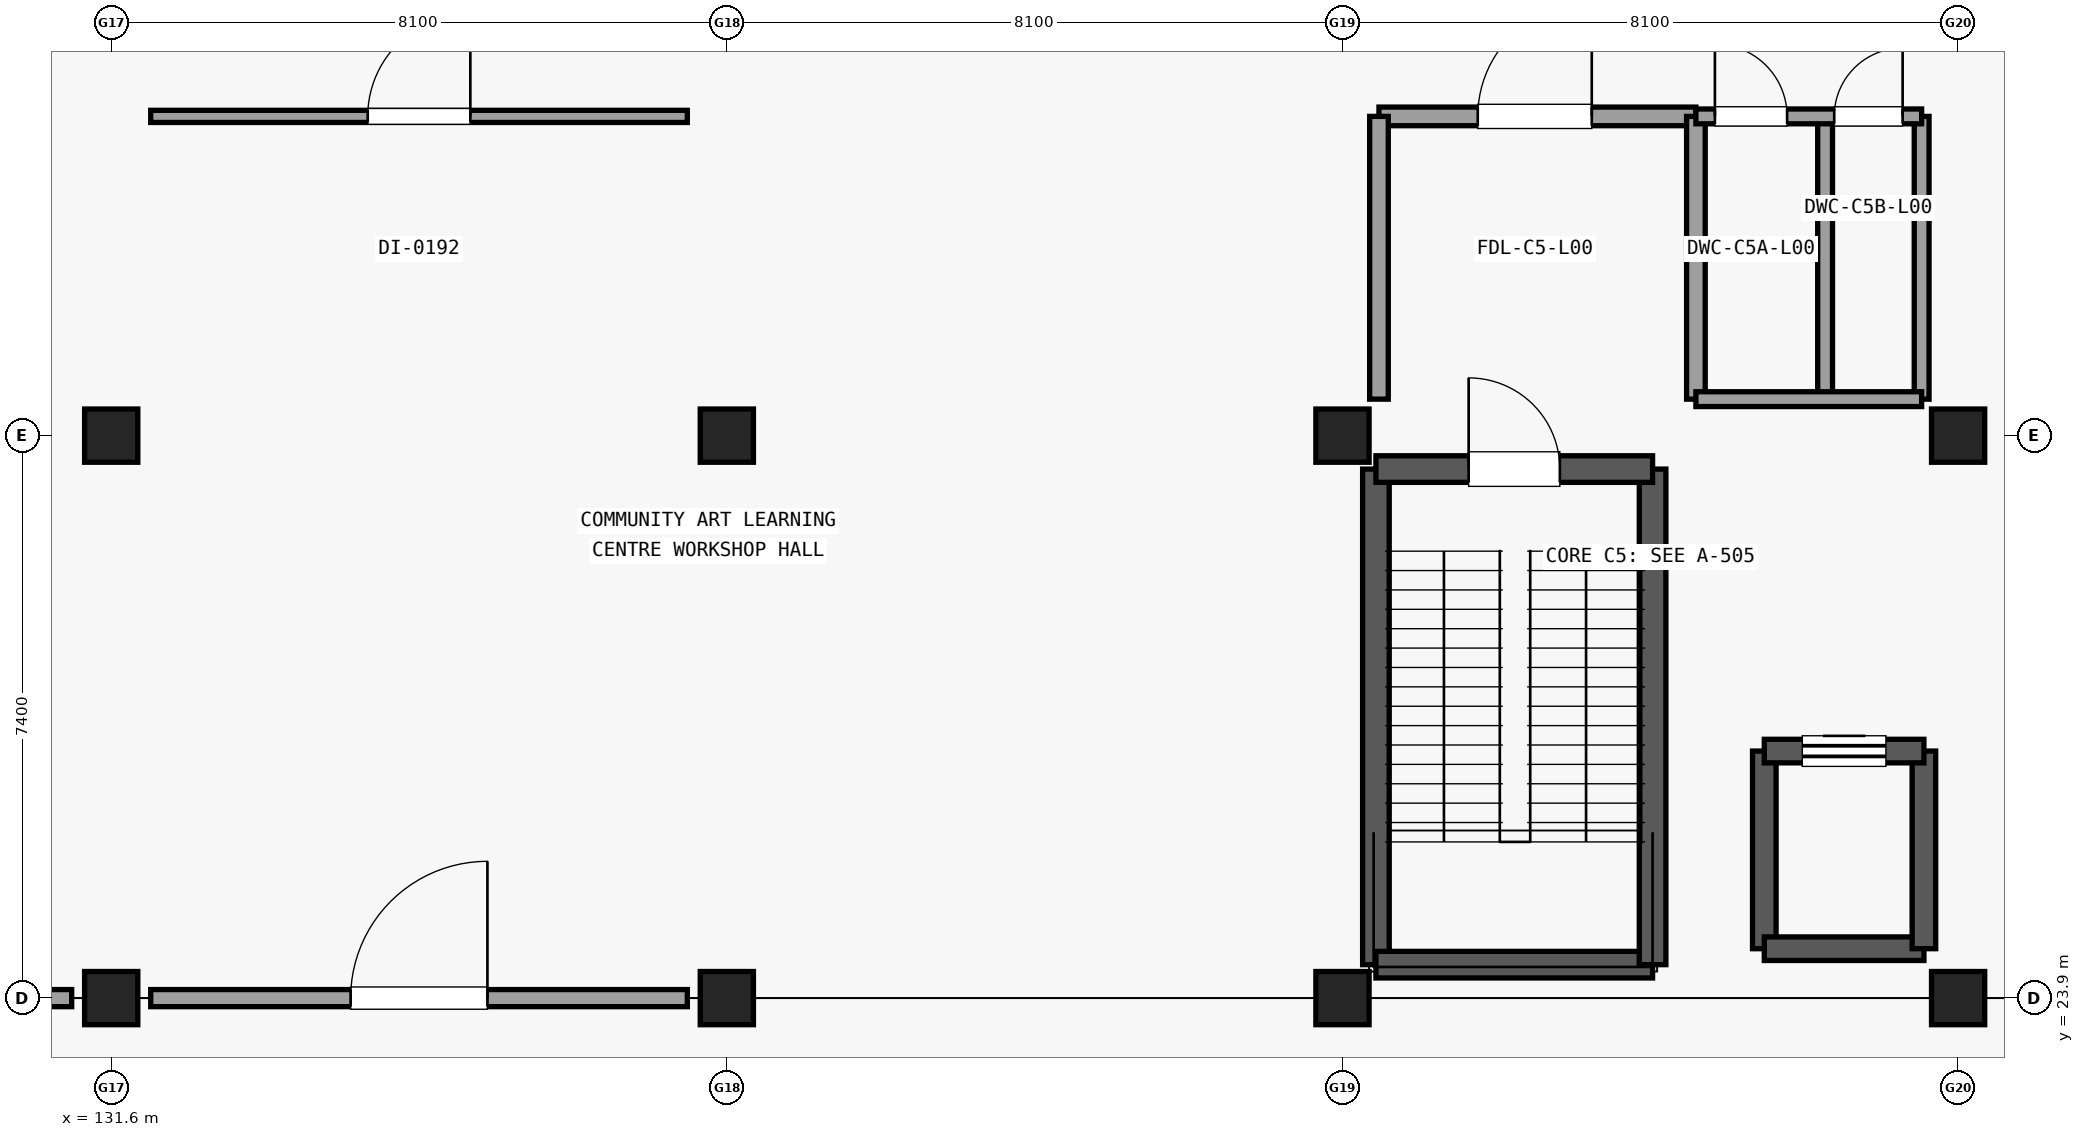
"""IFC4 building model, lengths in metres.
Left out: names, types, materials, properties, quantities, classifications, styles, units other than length and angle.
Written with IfcOpenShell. Run it as: python <this file> out.ifc"""

import sys

from ifc_helpers import new_model, si_unit, direction, frame, frame_2d, origin, origin_2d, place, context, subcontext, project, spatial, rectangle, extrude, element, fill, save


model = new_model("IFC4")
c1 = context("Model", 3, precision=1e-05, world=origin(), true_north=direction((0.0, 1.0)))
c2 = subcontext(c1, "Body", "Model", "MODEL_VIEW")
j1 = project(units=[si_unit("LENGTHUNIT", "METRE"), si_unit("PLANEANGLEUNIT", "RADIAN")], contexts=[c1])
p1 = place(None, origin())
s1 = spatial("IfcSite", under=j1, at=p1, CompositionType="ELEMENT")
p2 = place(p1, origin())
s2 = spatial("IfcBuilding", under=s1, at=p2, CompositionType="ELEMENT")
p3 = place(p2, origin())
s3 = spatial("IfcBuildingStorey", under=s2, at=p3, CompositionType="ELEMENT", Elevation=0.0)
for number, where, z_axis, x_axis in (
    (1, (131.6, 23.9, 0.0), (0.0, 0.0, 1.0), (1.0, 0.0, 0.0)),
    (2, (131.6, 31.3, 0.0), (0.0, 0.0, 1.0), (1.0, 0.0, 0.0)),
):
    element("IfcColumn", number, at=place(p3, frame(where, z_axis=z_axis, x_axis=x_axis)), inside=s3, PredefinedType="COLUMN", context=c2, shape_type="SweptSolid", body=[
        extrude(rectangle(XDim=0.7, YDim=0.7, at=origin_2d()), origin(), (0.0, 0.0, 1.0), 5.135),
    ])
for number, where, z_axis, x_axis in (
    (3, (139.7, 23.9, -0.28), (0.0, 0.0, 1.0), (1.0, 0.0, 0.0)),
    (4, (139.7, 31.3, -0.28), (0.0, 0.0, 1.0), (1.0, 0.0, 0.0)),
    (5, (147.8, 23.9, -0.28), (0.0, 0.0, 1.0), (1.0, 0.0, 0.0)),
    (6, (147.8, 31.3, -0.28), (0.0, 0.0, 1.0), (1.0, 0.0, 0.0)),
    (7, (155.9, 23.9, -0.28), (0.0, 0.0, 1.0), (1.0, 0.0, 0.0)),
    (8, (155.9, 31.3, -0.28), (0.0, 0.0, 1.0), (1.0, 0.0, 0.0)),
):
    element("IfcColumn", number, at=place(p3, frame(where, z_axis=z_axis, x_axis=x_axis)), inside=s3, PredefinedType="COLUMN", context=c2, shape_type="SweptSolid", body=[
        extrude(rectangle(XDim=0.7, YDim=0.7, at=origin_2d()), origin(), (0.0, 0.0, 1.0), 5.415),
    ])
p4 = place(p3, frame((148.24, 24.34, 0.0), z_axis=(0.0, 0.0, 1.0), x_axis=(0.0, 1.0, 0.0)))
e9 = element("IfcWall", 9, at=p4, inside=s3, PredefinedType="SHEAR", context=c2, shape_type="SweptSolid", body=[
    extrude(rectangle(XDim=6.52, YDim=0.35, at=frame_2d((3.26, 0.0))), origin(), (0.0, 0.0, 1.0), 5.13),
])
p5 = place(p3, frame((148.24, 24.34, 0.0), z_axis=(0.0, 0.0, 1.0), x_axis=(1.0, 0.0, 0.0)))
e10 = element("IfcWall", 10, at=p5, inside=s3, PredefinedType="SHEAR", context=c2, shape_type="SweptSolid", body=[
    extrude(rectangle(XDim=3.64, YDim=0.35, at=frame_2d((1.82, 0.0))), origin(), (0.0, 0.0, 1.0), 5.13),
])
p6 = place(p3, frame((151.88, 24.34, 0.0), z_axis=(0.0, 0.0, 1.0), x_axis=(0.0, 1.0, 0.0)))
e11 = element("IfcWall", 11, at=p6, inside=s3, PredefinedType="SHEAR", context=c2, shape_type="SweptSolid", body=[
    extrude(rectangle(XDim=6.52, YDim=0.35, at=frame_2d((3.26, 0.0))), origin(), (0.0, 0.0, 1.0), 5.13),
])
p7 = place(p3, frame((148.24, 30.86, 0.0), z_axis=(0.0, 0.0, 1.0), x_axis=(1.0, 0.0, 0.0)))
e12 = element("IfcWall", 12, at=p7, inside=s3, PredefinedType="SHEAR", context=c2, shape_type="SweptSolid", body=[
    extrude(rectangle(XDim=3.64, YDim=0.35, at=frame_2d((1.82, 0.0))), origin(), (0.0, 0.0, 1.0), 5.13),
])
p8 = place(p7, frame((1.22, 0.0, 0.0)))
e13 = element("IfcOpeningElement", 13, at=p8, cuts=e12, PredefinedType="OPENING", context=c2, shape_type="SweptSolid", body=[
    extrude(rectangle(XDim=1.2, YDim=2.15, at=frame_2d((0.6, 1.075))), frame((0.0, 0.185, 0.0), z_axis=(0.0, -1.0, 0.0), x_axis=(1.0, 0.0, 0.0)), (0.0, 0.0, 1.0), 0.37),
])
p9 = place(p3, frame((153.35, 24.55, 0.0), z_axis=(0.0, 0.0, 1.0), x_axis=(0.0, 1.0, 0.0)))
e14 = element("IfcWall", 14, at=p9, inside=s3, PredefinedType="SHEAR", context=c2, shape_type="SweptSolid", body=[
    extrude(rectangle(XDim=2.6, YDim=0.31, at=frame_2d((1.3, 0.0))), origin(), (0.0, 0.0, 1.0), 5.13),
])
p10 = place(p3, frame((153.35, 24.55, 0.0), z_axis=(0.0, 0.0, 1.0), x_axis=(1.0, 0.0, 0.0)))
e15 = element("IfcWall", 15, at=p10, inside=s3, PredefinedType="SHEAR", context=c2, shape_type="SweptSolid", body=[
    extrude(rectangle(XDim=2.1, YDim=0.31, at=frame_2d((1.05, 0.0))), origin(), (0.0, 0.0, 1.0), 5.13),
])
p11 = place(p3, frame((155.45, 24.55, 0.0), z_axis=(0.0, 0.0, 1.0), x_axis=(0.0, 1.0, 0.0)))
e16 = element("IfcWall", 16, at=p11, inside=s3, PredefinedType="SHEAR", context=c2, shape_type="SweptSolid", body=[
    extrude(rectangle(XDim=2.6, YDim=0.31, at=frame_2d((1.3, 0.0))), origin(), (0.0, 0.0, 1.0), 5.13),
])
p12 = place(p3, frame((153.35, 27.15, 0.0), z_axis=(0.0, 0.0, 1.0), x_axis=(1.0, 0.0, 0.0)))
e17 = element("IfcWall", 17, at=p12, inside=s3, PredefinedType="SHEAR", context=c2, shape_type="SweptSolid", body=[
    extrude(rectangle(XDim=2.1, YDim=0.31, at=frame_2d((1.05, 0.0))), origin(), (0.0, 0.0, 1.0), 5.13),
])
p13 = place(p12, frame((0.5, 0.0, 0.0)))
e18 = element("IfcOpeningElement", 18, at=p13, cuts=e17, PredefinedType="OPENING", context=c2, shape_type="SweptSolid", body=[
    extrude(rectangle(XDim=1.1, YDim=2.15, at=frame_2d((0.55, 1.075))), frame((0.0, 0.165, 0.0), z_axis=(0.0, -1.0, 0.0), x_axis=(1.0, 0.0, 0.0)), (0.0, 0.0, 1.0), 0.33),
])
p14 = place(p3, frame((148.28, 35.5, 0.0), z_axis=(0.0, 0.0, 1.0), x_axis=(1.0, 0.0, 0.0)))
e19 = element("IfcWall", 19, at=p14, inside=s3, PredefinedType="PARTITIONING", context=c2, shape_type="SweptSolid", body=[
    extrude(rectangle(XDim=4.17, YDim=0.245, at=frame_2d((2.085, 0.0))), origin(), (0.0, 0.0, 1.0), 4.325),
])
p15 = place(p14, frame((1.3, 0.0, 0.0)))
e20 = element("IfcOpeningElement", 20, at=p15, cuts=e19, PredefinedType="OPENING", context=c2, shape_type="SweptSolid", body=[
    extrude(rectangle(XDim=1.5, YDim=2.15, at=frame_2d((0.75, 1.075))), frame((0.0, 0.133, 0.0), z_axis=(0.0, -1.0, 0.0), x_axis=(1.0, 0.0, 0.0)), (0.0, 0.0, 1.0), 0.265),
])
for number, where, z_axis, x_axis in (
    (21, (148.28, 31.78, 0.0), (0.0, 0.0, 1.0), (0.0, 1.0, 0.0)),
    (22, (152.45, 31.78, 0.0), (0.0, 0.0, 1.0), (0.0, 1.0, 0.0)),
):
    element("IfcWall", number, at=place(p3, frame(where, z_axis=z_axis, x_axis=x_axis)), inside=s3, PredefinedType="PARTITIONING", context=c2, shape_type="SweptSolid", body=[
        extrude(rectangle(XDim=3.72, YDim=0.245, at=frame_2d((1.86, 0.0))), origin(), (0.0, 0.0, 1.0), 4.275),
    ])
for number, where, z_axis, x_axis in (
    (23, (154.15, 31.78, 0.0), (0.0, 0.0, 1.0), (0.0, 1.0, 0.0)),
    (24, (155.42, 31.78, 0.0), (0.0, 0.0, 1.0), (0.0, 1.0, 0.0)),
):
    element("IfcWall", number, at=place(p3, frame(where, z_axis=z_axis, x_axis=x_axis)), inside=s3, PredefinedType="PARTITIONING", context=c2, shape_type="SweptSolid", body=[
        extrude(rectangle(XDim=3.72, YDim=0.195, at=frame_2d((1.86, 0.0))), origin(), (0.0, 0.0, 1.0), 4.275),
    ])
p16 = place(p3, frame((152.45, 31.78, 0.0), z_axis=(0.0, 0.0, 1.0), x_axis=(1.0, 0.0, 0.0)))
e25 = element("IfcWall", 25, at=p16, inside=s3, PredefinedType="PARTITIONING", context=c2, shape_type="SweptSolid", body=[
    extrude(rectangle(XDim=2.97, YDim=0.195, at=frame_2d((1.485, 0.0))), origin(), (0.0, 0.0, 1.0), 4.275),
])
p17 = place(p3, frame((152.45, 35.5, 0.0), z_axis=(0.0, 0.0, 1.0), x_axis=(1.0, 0.0, 0.0)))
e26 = element("IfcWall", 26, at=p17, inside=s3, PredefinedType="PARTITIONING", context=c2, shape_type="SweptSolid", body=[
    extrude(rectangle(XDim=2.97, YDim=0.195, at=frame_2d((1.485, 0.0))), origin(), (0.0, 0.0, 1.0), 4.325),
])
p18 = place(p17, frame((0.25, 0.0, 0.0)))
e27 = element("IfcOpeningElement", 27, at=p18, cuts=e26, PredefinedType="OPENING", context=c2, shape_type="SweptSolid", body=[
    extrude(rectangle(XDim=0.95, YDim=2.1, at=frame_2d((0.475, 1.05))), frame((0.0, 0.107, 0.0), z_axis=(0.0, -1.0, 0.0), x_axis=(1.0, 0.0, 0.0)), (0.0, 0.0, 1.0), 0.215),
])
p19 = place(p17, frame((1.82, 0.0, 0.0)))
e28 = element("IfcOpeningElement", 28, at=p19, cuts=e26, PredefinedType="OPENING", context=c2, shape_type="SweptSolid", body=[
    extrude(rectangle(XDim=0.9, YDim=2.1, at=frame_2d((0.45, 1.05))), frame((0.0, 0.107, 0.0), z_axis=(0.0, -1.0, 0.0), x_axis=(1.0, 0.0, 0.0)), (0.0, 0.0, 1.0), 0.215),
])
p20 = place(p3, frame((124.02, 23.9, 0.0), z_axis=(0.0, 0.0, 1.0), x_axis=(1.0, 0.0, 0.0)))
e29 = element("IfcWall", 29, at=p20, inside=s3, PredefinedType="PARTITIONING", context=c2, shape_type="SweptSolid", body=[
    extrude(rectangle(XDim=7.06, YDim=0.225, at=frame_2d((3.53, 0.0))), origin(), (0.0, 0.0, 1.0), 4.275),
])
p21 = place(p20, frame((2.63, 0.0, 0.0)))
e30 = element("IfcOpeningElement", 30, at=p21, cuts=e29, PredefinedType="OPENING", context=c2, shape_type="SweptSolid", body=[
    extrude(rectangle(XDim=1.8, YDim=2.4, at=frame_2d((0.9, 1.2))), frame((0.0, 0.123, 0.0), z_axis=(0.0, -1.0, 0.0), x_axis=(1.0, 0.0, 0.0)), (0.0, 0.0, 1.0), 0.245),
])
p22 = place(p3, frame((132.12, 23.9, 0.0), z_axis=(0.0, 0.0, 1.0), x_axis=(1.0, 0.0, 0.0)))
e31 = element("IfcWall", 31, at=p22, inside=s3, PredefinedType="PARTITIONING", context=c2, shape_type="SweptSolid", body=[
    extrude(rectangle(XDim=7.06, YDim=0.225, at=frame_2d((3.53, 0.0))), origin(), (0.0, 0.0, 1.0), 4.275),
])
p23 = place(p22, frame((2.63, 0.0, 0.0)))
e32 = element("IfcOpeningElement", 32, at=p23, cuts=e31, PredefinedType="OPENING", context=c2, shape_type="SweptSolid", body=[
    extrude(rectangle(XDim=1.8, YDim=2.4, at=frame_2d((0.9, 1.2))), frame((0.0, 0.123, 0.0), z_axis=(0.0, -1.0, 0.0), x_axis=(1.0, 0.0, 0.0)), (0.0, 0.0, 1.0), 0.245),
])
p24 = place(p3, frame((132.12, 35.5, 0.0), z_axis=(0.0, 0.0, 1.0), x_axis=(1.0, 0.0, 0.0)))
e33 = element("IfcWall", 33, at=p24, inside=s3, PredefinedType="PARTITIONING", context=c2, shape_type="SweptSolid", body=[
    extrude(rectangle(XDim=7.06, YDim=0.16, at=frame_2d((3.53, 0.0))), origin(), (0.0, 0.0, 1.0), 4.325),
])
p25 = place(p24, frame((2.855, 0.0, 0.0)))
e34 = element("IfcOpeningElement", 34, at=p25, cuts=e33, PredefinedType="OPENING", context=c2, shape_type="SweptSolid", body=[
    extrude(rectangle(XDim=1.35, YDim=2.2, at=frame_2d((0.675, 1.1))), frame((0.0, 0.09, 0.0), z_axis=(0.0, -1.0, 0.0), x_axis=(1.0, 0.0, 0.0)), (0.0, 0.0, 1.0), 0.18),
])
p26 = place(p8, origin())
e35 = element("IfcDoor", 35, at=p26, inside=s3, OperationType="SINGLE_SWING_LEFT", PredefinedType="DOOR", context=c2, shape_type="SweptSolid", body=[
    extrude(rectangle(XDim=1.2, YDim=2.15, at=frame_2d((0.6, 1.075))), frame((0.0, 0.025, 0.0), z_axis=(0.0, -1.0, 0.0), x_axis=(1.0, 0.0, 0.0)), (0.0, 0.0, 1.0), 0.05),
])
fill(e13, e35)
p27 = place(p13, origin())
e36 = element("IfcDoor", 36, at=p27, inside=s3, OperationType="SLIDING_TO_LEFT", PredefinedType="DOOR", context=c2, shape_type="SweptSolid", body=[
    extrude(rectangle(XDim=1.1, YDim=2.15, at=frame_2d((0.55, 1.075))), frame((0.0, 0.025, 0.0), z_axis=(0.0, -1.0, 0.0), x_axis=(1.0, 0.0, 0.0)), (0.0, 0.0, 1.0), 0.05),
])
fill(e18, e36)
p28 = place(p15, origin())
e37 = element("IfcDoor", 37, at=p28, inside=s3, OperationType="SINGLE_SWING_RIGHT", PredefinedType="DOOR", context=c2, shape_type="SweptSolid", body=[
    extrude(rectangle(XDim=1.5, YDim=2.15, at=frame_2d((0.75, 1.075))), frame((0.0, 0.025, 0.0), z_axis=(0.0, -1.0, 0.0), x_axis=(1.0, 0.0, 0.0)), (0.0, 0.0, 1.0), 0.05),
])
fill(e20, e37)
p29 = place(p18, origin())
e38 = element("IfcDoor", 38, at=p29, inside=s3, OperationType="SINGLE_SWING_LEFT", PredefinedType="DOOR", context=c2, shape_type="SweptSolid", body=[
    extrude(rectangle(XDim=0.95, YDim=2.1, at=frame_2d((0.475, 1.05))), frame((0.0, 0.025, 0.0), z_axis=(0.0, -1.0, 0.0), x_axis=(1.0, 0.0, 0.0)), (0.0, 0.0, 1.0), 0.05),
])
fill(e27, e38)
p30 = place(p19, origin())
e39 = element("IfcDoor", 39, at=p30, inside=s3, OperationType="SINGLE_SWING_RIGHT", PredefinedType="DOOR", context=c2, shape_type="SweptSolid", body=[
    extrude(rectangle(XDim=0.9, YDim=2.1, at=frame_2d((0.45, 1.05))), frame((0.0, 0.025, 0.0), z_axis=(0.0, -1.0, 0.0), x_axis=(1.0, 0.0, 0.0)), (0.0, 0.0, 1.0), 0.05),
])
fill(e28, e39)
p31 = place(p23, origin())
e40 = element("IfcDoor", 40, at=p31, inside=s3, OperationType="SINGLE_SWING_RIGHT", PredefinedType="DOOR", context=c2, shape_type="SweptSolid", body=[
    extrude(rectangle(XDim=1.8, YDim=2.4, at=frame_2d((0.9, 1.2))), frame((0.0, 0.025, 0.0), z_axis=(0.0, -1.0, 0.0), x_axis=(1.0, 0.0, 0.0)), (0.0, 0.0, 1.0), 0.05),
])
fill(e32, e40)
p32 = place(p25, origin())
e41 = element("IfcDoor", 41, at=p32, inside=s3, OperationType="SINGLE_SWING_RIGHT", PredefinedType="DOOR", context=c2, shape_type="SweptSolid", body=[
    extrude(rectangle(XDim=1.35, YDim=2.2, at=frame_2d((0.675, 1.1))), frame((0.0, 0.025, 0.0), z_axis=(0.0, -1.0, 0.0), x_axis=(1.0, 0.0, 0.0)), (0.0, 0.0, 1.0), 0.05),
])
fill(e34, e41)
save(model, sys.argv[1])
